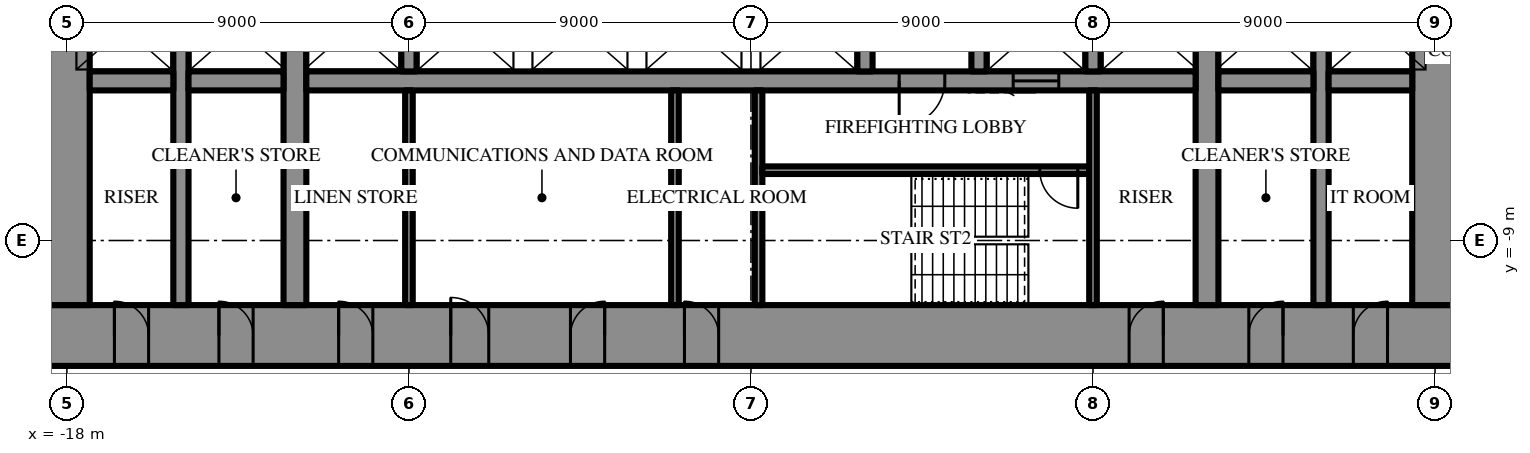
"""IFC4 building model, lengths in metres.
Left out: names, types, materials, properties, quantities, classifications, styles, units other than length and angle.
Written with IfcOpenShell. Run it as: python <this file> out.ifc"""

import sys

from ifc_helpers import new_model, si_unit, direction, frame, frame_2d, origin, place, context, subcontext, project, spatial, rectangle, extrude, element, fill, save


model = new_model("IFC4")
c1 = context("Model", 3, precision=1e-05, world=origin(), true_north=direction((0.0, 1.0)))
c2 = subcontext(c1, "Body", "Model", "MODEL_VIEW")
j1 = project(units=[si_unit("LENGTHUNIT", "METRE"), si_unit("PLANEANGLEUNIT", "RADIAN")], contexts=[c1])
p1 = place(None, origin())
s1 = spatial("IfcSite", under=j1, at=p1, CompositionType="ELEMENT")
p2 = place(p1, origin())
s2 = spatial("IfcBuilding", under=s1, at=p2, CompositionType="ELEMENT")
p3 = place(p2, frame((0.0, 0.0, 86.5)))
s3 = spatial("IfcBuildingStorey", under=s2, at=p3, CompositionType="ELEMENT", Elevation=86.5)
p4 = place(p3, frame((18.6, -11.5, 0.0), z_axis=(0.0, 0.0, 1.0), x_axis=(-1.0, 0.0, 0.0)))
e1 = element("IfcWall", 1, at=p4, inside=s3, PredefinedType="SHEAR", context=c2, shape_type="SweptSolid", body=[
    extrude(rectangle(XDim=37.2, YDim=1.6, at=frame_2d((18.6, 0.0))), origin(), (0.0, 0.0, 1.0), 4.2),
])
p5 = place(p4, frame((19.45, 0.0, 0.0)))
e2 = element("IfcOpeningElement", 2, at=p5, cuts=e1, PredefinedType="OPENING", context=c2, shape_type="SweptSolid", body=[
    extrude(rectangle(XDim=0.9, YDim=2.2, at=frame_2d((0.45, 1.1))), frame((0.0, 0.81, 0.0), z_axis=(0.0, -1.0, 0.0), x_axis=(1.0, 0.0, 0.0)), (0.0, 0.0, 1.0), 1.62),
])
p6 = place(p4, frame((22.45, 0.0, 0.0)))
e3 = element("IfcOpeningElement", 3, at=p6, cuts=e1, PredefinedType="OPENING", context=c2, shape_type="SweptSolid", body=[
    extrude(rectangle(XDim=0.9, YDim=2.2, at=frame_2d((0.45, 1.1))), frame((0.0, 0.81, 0.0), z_axis=(0.0, -1.0, 0.0), x_axis=(1.0, 0.0, 0.0)), (0.0, 0.0, 1.0), 1.62),
])
p7 = place(p4, frame((25.5, 0.0, 0.0)))
e4 = element("IfcOpeningElement", 4, at=p7, cuts=e1, PredefinedType="OPENING", context=c2, shape_type="SweptSolid", body=[
    extrude(rectangle(XDim=1.0, YDim=2.2, at=frame_2d((0.5, 1.1))), frame((0.0, 0.81, 0.0), z_axis=(0.0, -1.0, 0.0), x_axis=(1.0, 0.0, 0.0)), (0.0, 0.0, 1.0), 1.62),
])
p8 = place(p4, frame((1.85, 0.0, 0.0)))
e5 = element("IfcOpeningElement", 5, at=p8, cuts=e1, PredefinedType="OPENING", context=c2, shape_type="SweptSolid", body=[
    extrude(rectangle(XDim=0.9, YDim=2.2, at=frame_2d((0.45, 1.1))), frame((0.0, 0.81, 0.0), z_axis=(0.0, -1.0, 0.0), x_axis=(1.0, 0.0, 0.0)), (0.0, 0.0, 1.0), 1.62),
])
p9 = place(p4, frame((4.6, 0.0, 0.0)))
e6 = element("IfcOpeningElement", 6, at=p9, cuts=e1, PredefinedType="OPENING", context=c2, shape_type="SweptSolid", body=[
    extrude(rectangle(XDim=0.9, YDim=2.2, at=frame_2d((0.45, 1.1))), frame((0.0, 0.81, 0.0), z_axis=(0.0, -1.0, 0.0), x_axis=(1.0, 0.0, 0.0)), (0.0, 0.0, 1.0), 1.62),
])
p10 = place(p4, frame((7.75, 0.0, 0.0)))
e7 = element("IfcOpeningElement", 7, at=p10, cuts=e1, PredefinedType="OPENING", context=c2, shape_type="SweptSolid", body=[
    extrude(rectangle(XDim=0.9, YDim=2.2, at=frame_2d((0.45, 1.1))), frame((0.0, 0.81, 0.0), z_axis=(0.0, -1.0, 0.0), x_axis=(1.0, 0.0, 0.0)), (0.0, 0.0, 1.0), 1.62),
])
p11 = place(p4, frame((28.55, 0.0, 0.0)))
e8 = element("IfcOpeningElement", 8, at=p11, cuts=e1, PredefinedType="OPENING", context=c2, shape_type="SweptSolid", body=[
    extrude(rectangle(XDim=0.9, YDim=2.2, at=frame_2d((0.45, 1.1))), frame((0.0, 0.81, 0.0), z_axis=(0.0, -1.0, 0.0), x_axis=(1.0, 0.0, 0.0)), (0.0, 0.0, 1.0), 1.62),
])
p12 = place(p4, frame((31.7, 0.0, 0.0)))
e9 = element("IfcOpeningElement", 9, at=p12, cuts=e1, PredefinedType="OPENING", context=c2, shape_type="SweptSolid", body=[
    extrude(rectangle(XDim=0.9, YDim=2.2, at=frame_2d((0.45, 1.1))), frame((0.0, 0.81, 0.0), z_axis=(0.0, -1.0, 0.0), x_axis=(1.0, 0.0, 0.0)), (0.0, 0.0, 1.0), 1.62),
])
p13 = place(p4, frame((34.45, 0.0, 0.0)))
e10 = element("IfcOpeningElement", 10, at=p13, cuts=e1, PredefinedType="OPENING", context=c2, shape_type="SweptSolid", body=[
    extrude(rectangle(XDim=0.9, YDim=2.2, at=frame_2d((0.45, 1.1))), frame((0.0, 0.81, 0.0), z_axis=(0.0, -1.0, 0.0), x_axis=(1.0, 0.0, 0.0)), (0.0, 0.0, 1.0), 1.62),
])
p14 = place(p3, frame((18.0, -10.7, 0.0), z_axis=(0.0, 0.0, 1.0), x_axis=(0.0, 1.0, 0.0)))
e11 = element("IfcWall", 11, at=p14, inside=s3, PredefinedType="SHEAR", context=c2, shape_type="SweptSolid", body=[
    extrude(rectangle(XDim=21.4, YDim=1.2, at=frame_2d((10.7, 0.0))), origin(), (0.0, 0.0, 1.0), 4.2),
])
p15 = place(p14, frame((9.8, 0.0, 0.0)))
e12 = element("IfcOpeningElement", 12, at=p15, cuts=e11, PredefinedType="OPENING", context=c2, shape_type="SweptSolid", body=[
    extrude(rectangle(XDim=1.8, YDim=2.4, at=frame_2d((0.9, 1.2))), frame((0.0, 0.61, 0.0), z_axis=(0.0, -1.0, 0.0), x_axis=(1.0, 0.0, 0.0)), (0.0, 0.0, 1.0), 1.22),
])
p16 = place(p3, frame((-18.0, 10.7, 0.0), z_axis=(0.0, 0.0, 1.0), x_axis=(0.0, -1.0, 0.0)))
e13 = element("IfcWall", 13, at=p16, inside=s3, PredefinedType="SHEAR", context=c2, shape_type="SweptSolid", body=[
    extrude(rectangle(XDim=21.4, YDim=1.2, at=frame_2d((10.7, 0.0))), origin(), (0.0, 0.0, 1.0), 4.2),
])
p17 = place(p16, frame((9.8, 0.0, 0.0)))
e14 = element("IfcOpeningElement", 14, at=p17, cuts=e13, PredefinedType="OPENING", context=c2, shape_type="SweptSolid", body=[
    extrude(rectangle(XDim=1.8, YDim=2.4, at=frame_2d((0.9, 1.2))), frame((0.0, 0.61, 0.0), z_axis=(0.0, -1.0, 0.0), x_axis=(1.0, 0.0, 0.0)), (0.0, 0.0, 1.0), 1.22),
])
p18 = place(p3, frame((12.0, -10.7, 0.0), z_axis=(0.0, 0.0, 1.0), x_axis=(0.0, 1.0, 0.0)))
e15 = element("IfcWall", 15, at=p18, inside=s3, PredefinedType="SHEAR", context=c2, shape_type="SweptSolid", body=[
    extrude(rectangle(XDim=21.4, YDim=0.6, at=frame_2d((10.7, 0.0))), origin(), (0.0, 0.0, 1.0), 4.2),
])
p19 = place(p18, frame((9.8, 0.0, 0.0)))
e16 = element("IfcOpeningElement", 16, at=p19, cuts=e15, PredefinedType="OPENING", context=c2, shape_type="SweptSolid", body=[
    extrude(rectangle(XDim=1.8, YDim=2.4, at=frame_2d((0.9, 1.2))), frame((0.0, 0.31, 0.0), z_axis=(0.0, -1.0, 0.0), x_axis=(1.0, 0.0, 0.0)), (0.0, 0.0, 1.0), 0.62),
])
p20 = place(p3, frame((-12.0, -10.7, 0.0), z_axis=(0.0, 0.0, 1.0), x_axis=(0.0, 1.0, 0.0)))
e17 = element("IfcWall", 17, at=p20, inside=s3, PredefinedType="SHEAR", context=c2, shape_type="SweptSolid", body=[
    extrude(rectangle(XDim=21.4, YDim=0.6, at=frame_2d((10.7, 0.0))), origin(), (0.0, 0.0, 1.0), 4.2),
])
p21 = place(p20, frame((9.8, 0.0, 0.0)))
e18 = element("IfcOpeningElement", 18, at=p21, cuts=e17, PredefinedType="OPENING", context=c2, shape_type="SweptSolid", body=[
    extrude(rectangle(XDim=1.8, YDim=2.4, at=frame_2d((0.9, 1.2))), frame((0.0, 0.31, 0.0), z_axis=(0.0, -1.0, 0.0), x_axis=(1.0, 0.0, 0.0)), (0.0, 0.0, 1.0), 0.62),
])
p22 = place(p3, frame((15.0, -10.7, 0.0), z_axis=(0.0, 0.0, 1.0), x_axis=(0.0, 1.0, 0.0)))
e19 = element("IfcWall", 19, at=p22, inside=s3, PredefinedType="SHEAR", context=c2, shape_type="SweptSolid", body=[
    extrude(rectangle(XDim=21.4, YDim=0.4, at=frame_2d((10.7, 0.0))), origin(), (0.0, 0.0, 1.0), 4.2),
])
p23 = place(p22, frame((9.8, 0.0, 0.0)))
e20 = element("IfcOpeningElement", 20, at=p23, cuts=e19, PredefinedType="OPENING", context=c2, shape_type="SweptSolid", body=[
    extrude(rectangle(XDim=1.8, YDim=2.4, at=frame_2d((0.9, 1.2))), frame((0.0, 0.21, 0.0), z_axis=(0.0, -1.0, 0.0), x_axis=(1.0, 0.0, 0.0)), (0.0, 0.0, 1.0), 0.42),
])
p24 = place(p3, frame((-15.0, -10.7, 0.0), z_axis=(0.0, 0.0, 1.0), x_axis=(0.0, 1.0, 0.0)))
e21 = element("IfcWall", 21, at=p24, inside=s3, PredefinedType="SHEAR", context=c2, shape_type="SweptSolid", body=[
    extrude(rectangle(XDim=21.4, YDim=0.4, at=frame_2d((10.7, 0.0))), origin(), (0.0, 0.0, 1.0), 4.2),
])
p25 = place(p24, frame((9.8, 0.0, 0.0)))
e22 = element("IfcOpeningElement", 22, at=p25, cuts=e21, PredefinedType="OPENING", context=c2, shape_type="SweptSolid", body=[
    extrude(rectangle(XDim=1.8, YDim=2.4, at=frame_2d((0.9, 1.2))), frame((0.0, 0.21, 0.0), z_axis=(0.0, -1.0, 0.0), x_axis=(1.0, 0.0, 0.0)), (0.0, 0.0, 1.0), 0.42),
])
p26 = place(p3, frame((17.4, -4.8, 0.0), z_axis=(0.0, 0.0, 1.0), x_axis=(-1.0, 0.0, 0.0)))
e23 = element("IfcWall", 23, at=p26, inside=s3, PredefinedType="SHEAR", context=c2, shape_type="SweptSolid", body=[
    extrude(rectangle(XDim=2.2, YDim=0.5, at=frame_2d((1.1, 0.0))), origin(), (0.0, 0.0, 1.0), 4.2),
])
p27 = place(p3, frame((14.8, -4.8, 0.0), z_axis=(0.0, 0.0, 1.0), x_axis=(-1.0, 0.0, 0.0)))
e24 = element("IfcWall", 24, at=p27, inside=s3, PredefinedType="SHEAR", context=c2, shape_type="SweptSolid", body=[
    extrude(rectangle(XDim=2.5, YDim=0.5, at=frame_2d((1.25, 0.0))), origin(), (0.0, 0.0, 1.0), 4.2),
])
p28 = place(p3, frame((11.7, -4.8, 0.0), z_axis=(0.0, 0.0, 1.0), x_axis=(-1.0, 0.0, 0.0)))
e25 = element("IfcWall", 25, at=p28, inside=s3, PredefinedType="SHEAR", context=c2, shape_type="SweptSolid", body=[
    extrude(rectangle(XDim=23.4, YDim=0.5, at=frame_2d((11.7, 0.0))), origin(), (0.0, 0.0, 1.0), 4.2),
])
p29 = place(p28, frame((6.6, 0.0, 0.0)))
e26 = element("IfcOpeningElement", 26, at=p29, cuts=e25, PredefinedType="OPENING", context=c2, shape_type="SweptSolid", body=[
    extrude(rectangle(XDim=1.2, YDim=2.2, at=frame_2d((0.6, 1.1))), frame((0.0, 0.26, 0.0), z_axis=(0.0, -1.0, 0.0), x_axis=(1.0, 0.0, 0.0)), (0.0, 0.0, 1.0), 0.52),
])
p30 = place(p28, frame((3.6, 0.0, 0.0)))
e27 = element("IfcOpeningElement", 27, at=p30, cuts=e25, PredefinedType="OPENING", context=c2, shape_type="SweptSolid", body=[
    extrude(rectangle(XDim=1.2, YDim=2.2, at=frame_2d((0.6, 1.1))), frame((0.0, 0.26, 0.0), z_axis=(0.0, -1.0, 0.0), x_axis=(1.0, 0.0, 0.0)), (0.0, 0.0, 1.0), 0.52),
])
p31 = place(p3, frame((-12.3, -4.8, 0.0), z_axis=(0.0, 0.0, 1.0), x_axis=(-1.0, 0.0, 0.0)))
e28 = element("IfcWall", 28, at=p31, inside=s3, PredefinedType="SHEAR", context=c2, shape_type="SweptSolid", body=[
    extrude(rectangle(XDim=2.5, YDim=0.5, at=frame_2d((1.25, 0.0))), origin(), (0.0, 0.0, 1.0), 4.2),
])
p32 = place(p3, frame((-15.2, -4.8, 0.0), z_axis=(0.0, 0.0, 1.0), x_axis=(-1.0, 0.0, 0.0)))
e29 = element("IfcWall", 29, at=p32, inside=s3, PredefinedType="SHEAR", context=c2, shape_type="SweptSolid", body=[
    extrude(rectangle(XDim=2.2, YDim=0.5, at=frame_2d((1.1, 0.0))), origin(), (0.0, 0.0, 1.0), 4.2),
])
for number, where, z_axis, x_axis in (
    (30, (9.0, -2.25, 0.0), (0.0, 0.0, 1.0), (0.0, -1.0, 0.0)),
    (31, (6.0, -2.25, 0.0), (0.0, 0.0, 1.0), (0.0, -1.0, 0.0)),
    (32, (3.0, -2.25, 0.0), (0.0, 0.0, 1.0), (0.0, -1.0, 0.0)),
    (33, (-9.0, -2.25, 0.0), (0.0, 0.0, 1.0), (0.0, -1.0, 0.0)),
):
    element("IfcWall", number, at=place(p3, frame(where, z_axis=z_axis, x_axis=x_axis)), inside=s3, PredefinedType="SHEAR", context=c2, shape_type="SweptSolid", body=[
        extrude(rectangle(XDim=2.3, YDim=0.4, at=frame_2d((1.15, 0.0))), origin(), (0.0, 0.0, 1.0), 4.2),
    ])
p33 = place(p3, frame((0.2, -5.05, 0.0), z_axis=(0.0, 0.0, 1.0), x_axis=(0.0, -1.0, 0.0)))
e34 = element("IfcWall", 34, at=p33, inside=s3, PredefinedType="SHEAR", context=c2, shape_type="SweptSolid", body=[
    extrude(rectangle(XDim=5.65, YDim=0.2, at=frame_2d((2.825, 0.0))), origin(), (0.0, 0.0, 1.0), 4.2),
])
p34 = place(p3, frame((8.9, -7.15, 0.0), z_axis=(0.0, 0.0, 1.0), x_axis=(-1.0, 0.0, 0.0)))
e35 = element("IfcWall", 35, at=p34, inside=s3, PredefinedType="SHEAR", context=c2, shape_type="SweptSolid", body=[
    extrude(rectangle(XDim=8.6, YDim=0.2, at=frame_2d((4.3, 0.0))), origin(), (0.0, 0.0, 1.0), 4.2),
])
p35 = place(p34, frame((0.3, 0.0, 0.0)))
e36 = element("IfcOpeningElement", 36, at=p35, cuts=e35, PredefinedType="OPENING", context=c2, shape_type="SweptSolid", body=[
    extrude(rectangle(XDim=1.0, YDim=2.2, at=frame_2d((0.5, 1.1))), frame((0.0, 0.11, 0.0), z_axis=(0.0, -1.0, 0.0), x_axis=(1.0, 0.0, 0.0)), (0.0, 0.0, 1.0), 0.22),
])
for number, where, z_axis, x_axis in (
    (37, (9.0, -5.05, 0.0), (0.0, 0.0, 1.0), (0.0, -1.0, 0.0)),
    (38, (-9.0, -5.05, 0.0), (0.0, 0.0, 1.0), (0.0, -1.0, 0.0)),
    (39, (-2.0, -5.05, 0.0), (0.0, 0.0, 1.0), (0.0, -1.0, 0.0)),
):
    element("IfcWall", number, at=place(p3, frame(where, z_axis=z_axis, x_axis=x_axis)), inside=s3, PredefinedType="PARTITIONING", context=c2, shape_type="SweptSolid", body=[
        extrude(rectangle(XDim=5.65, YDim=0.2, at=frame_2d((2.825, 0.0))), origin(), (0.0, 0.0, 1.0), 4.0),
    ])
p36 = place(p29, origin())
e40 = element("IfcDoor", 40, at=p36, inside=s3, OperationType="SINGLE_SWING_LEFT", PredefinedType="DOOR", context=c2, shape_type="SweptSolid", body=[
    extrude(rectangle(XDim=1.2, YDim=2.2, at=frame_2d((0.6, 1.1))), frame((0.0, 0.025, 0.0), z_axis=(0.0, -1.0, 0.0), x_axis=(1.0, 0.0, 0.0)), (0.0, 0.0, 1.0), 0.05),
])
fill(e26, e40)
p37 = place(p35, origin())
e41 = element("IfcDoor", 41, at=p37, inside=s3, OperationType="SINGLE_SWING_RIGHT", PredefinedType="DOOR", context=c2, shape_type="SweptSolid", body=[
    extrude(rectangle(XDim=1.0, YDim=2.2, at=frame_2d((0.5, 1.1))), frame((0.0, 0.025, 0.0), z_axis=(0.0, -1.0, 0.0), x_axis=(1.0, 0.0, 0.0)), (0.0, 0.0, 1.0), 0.05),
])
fill(e36, e41)
p38 = place(p5, frame((0.9, 0.0, 0.0), z_axis=(0.0, 0.0, 1.0), x_axis=(-1.0, 0.0, 0.0)))
e42 = element("IfcDoor", 42, at=p38, inside=s3, OperationType="SINGLE_SWING_RIGHT", PredefinedType="DOOR", context=c2, shape_type="SweptSolid", body=[
    extrude(rectangle(XDim=0.9, YDim=2.2, at=frame_2d((0.45, 1.1))), frame((0.0, 0.025, 0.0), z_axis=(0.0, -1.0, 0.0), x_axis=(1.0, 0.0, 0.0)), (0.0, 0.0, 1.0), 0.05),
])
fill(e2, e42)
p39 = place(p6, frame((0.9, 0.0, 0.0), z_axis=(0.0, 0.0, 1.0), x_axis=(-1.0, 0.0, 0.0)))
e43 = element("IfcDoor", 43, at=p39, inside=s3, OperationType="SINGLE_SWING_LEFT", PredefinedType="DOOR", context=c2, shape_type="SweptSolid", body=[
    extrude(rectangle(XDim=0.9, YDim=2.2, at=frame_2d((0.45, 1.1))), frame((0.0, 0.025, 0.0), z_axis=(0.0, -1.0, 0.0), x_axis=(1.0, 0.0, 0.0)), (0.0, 0.0, 1.0), 0.05),
])
fill(e3, e43)
p40 = place(p7, frame((1.0, 0.0, 0.0), z_axis=(0.0, 0.0, 1.0), x_axis=(-1.0, 0.0, 0.0)))
e44 = element("IfcDoor", 44, at=p40, inside=s3, OperationType="SINGLE_SWING_RIGHT", PredefinedType="DOOR", context=c2, shape_type="SweptSolid", body=[
    extrude(rectangle(XDim=1.0, YDim=2.2, at=frame_2d((0.5, 1.1))), frame((0.0, 0.025, 0.0), z_axis=(0.0, -1.0, 0.0), x_axis=(1.0, 0.0, 0.0)), (0.0, 0.0, 1.0), 0.05),
])
fill(e4, e44)
p41 = place(p8, frame((0.9, 0.0, 0.0), z_axis=(0.0, 0.0, 1.0), x_axis=(-1.0, 0.0, 0.0)))
e45 = element("IfcDoor", 45, at=p41, inside=s3, OperationType="SINGLE_SWING_LEFT", PredefinedType="DOOR", context=c2, shape_type="SweptSolid", body=[
    extrude(rectangle(XDim=0.9, YDim=2.2, at=frame_2d((0.45, 1.1))), frame((0.0, 0.025, 0.0), z_axis=(0.0, -1.0, 0.0), x_axis=(1.0, 0.0, 0.0)), (0.0, 0.0, 1.0), 0.05),
])
fill(e5, e45)
p42 = place(p9, frame((0.9, 0.0, 0.0), z_axis=(0.0, 0.0, 1.0), x_axis=(-1.0, 0.0, 0.0)))
e46 = element("IfcDoor", 46, at=p42, inside=s3, OperationType="SINGLE_SWING_LEFT", PredefinedType="DOOR", context=c2, shape_type="SweptSolid", body=[
    extrude(rectangle(XDim=0.9, YDim=2.2, at=frame_2d((0.45, 1.1))), frame((0.0, 0.025, 0.0), z_axis=(0.0, -1.0, 0.0), x_axis=(1.0, 0.0, 0.0)), (0.0, 0.0, 1.0), 0.05),
])
fill(e6, e46)
p43 = place(p10, frame((0.9, 0.0, 0.0), z_axis=(0.0, 0.0, 1.0), x_axis=(-1.0, 0.0, 0.0)))
e47 = element("IfcDoor", 47, at=p43, inside=s3, OperationType="SINGLE_SWING_LEFT", PredefinedType="DOOR", context=c2, shape_type="SweptSolid", body=[
    extrude(rectangle(XDim=0.9, YDim=2.2, at=frame_2d((0.45, 1.1))), frame((0.0, 0.025, 0.0), z_axis=(0.0, -1.0, 0.0), x_axis=(1.0, 0.0, 0.0)), (0.0, 0.0, 1.0), 0.05),
])
fill(e7, e47)
p44 = place(p11, frame((0.9, 0.0, 0.0), z_axis=(0.0, 0.0, 1.0), x_axis=(-1.0, 0.0, 0.0)))
e48 = element("IfcDoor", 48, at=p44, inside=s3, OperationType="SINGLE_SWING_RIGHT", PredefinedType="DOOR", context=c2, shape_type="SweptSolid", body=[
    extrude(rectangle(XDim=0.9, YDim=2.2, at=frame_2d((0.45, 1.1))), frame((0.0, 0.025, 0.0), z_axis=(0.0, -1.0, 0.0), x_axis=(1.0, 0.0, 0.0)), (0.0, 0.0, 1.0), 0.05),
])
fill(e8, e48)
p45 = place(p12, frame((0.9, 0.0, 0.0), z_axis=(0.0, 0.0, 1.0), x_axis=(-1.0, 0.0, 0.0)))
e49 = element("IfcDoor", 49, at=p45, inside=s3, OperationType="SINGLE_SWING_RIGHT", PredefinedType="DOOR", context=c2, shape_type="SweptSolid", body=[
    extrude(rectangle(XDim=0.9, YDim=2.2, at=frame_2d((0.45, 1.1))), frame((0.0, 0.025, 0.0), z_axis=(0.0, -1.0, 0.0), x_axis=(1.0, 0.0, 0.0)), (0.0, 0.0, 1.0), 0.05),
])
fill(e9, e49)
p46 = place(p13, frame((0.9, 0.0, 0.0), z_axis=(0.0, 0.0, 1.0), x_axis=(-1.0, 0.0, 0.0)))
e50 = element("IfcDoor", 50, at=p46, inside=s3, OperationType="SINGLE_SWING_RIGHT", PredefinedType="DOOR", context=c2, shape_type="SweptSolid", body=[
    extrude(rectangle(XDim=0.9, YDim=2.2, at=frame_2d((0.45, 1.1))), frame((0.0, 0.025, 0.0), z_axis=(0.0, -1.0, 0.0), x_axis=(1.0, 0.0, 0.0)), (0.0, 0.0, 1.0), 0.05),
])
fill(e10, e50)
p47 = place(p30, origin())
e51 = element("IfcDoor", 51, at=p47, inside=s3, OperationType="SLIDING_TO_LEFT", PredefinedType="DOOR", context=c2, shape_type="SweptSolid", body=[
    extrude(rectangle(XDim=1.2, YDim=2.2, at=frame_2d((0.6, 1.1))), frame((0.0, 0.025, 0.0), z_axis=(0.0, -1.0, 0.0), x_axis=(1.0, 0.0, 0.0)), (0.0, 0.0, 1.0), 0.05),
])
fill(e27, e51)
save(model, sys.argv[1])
